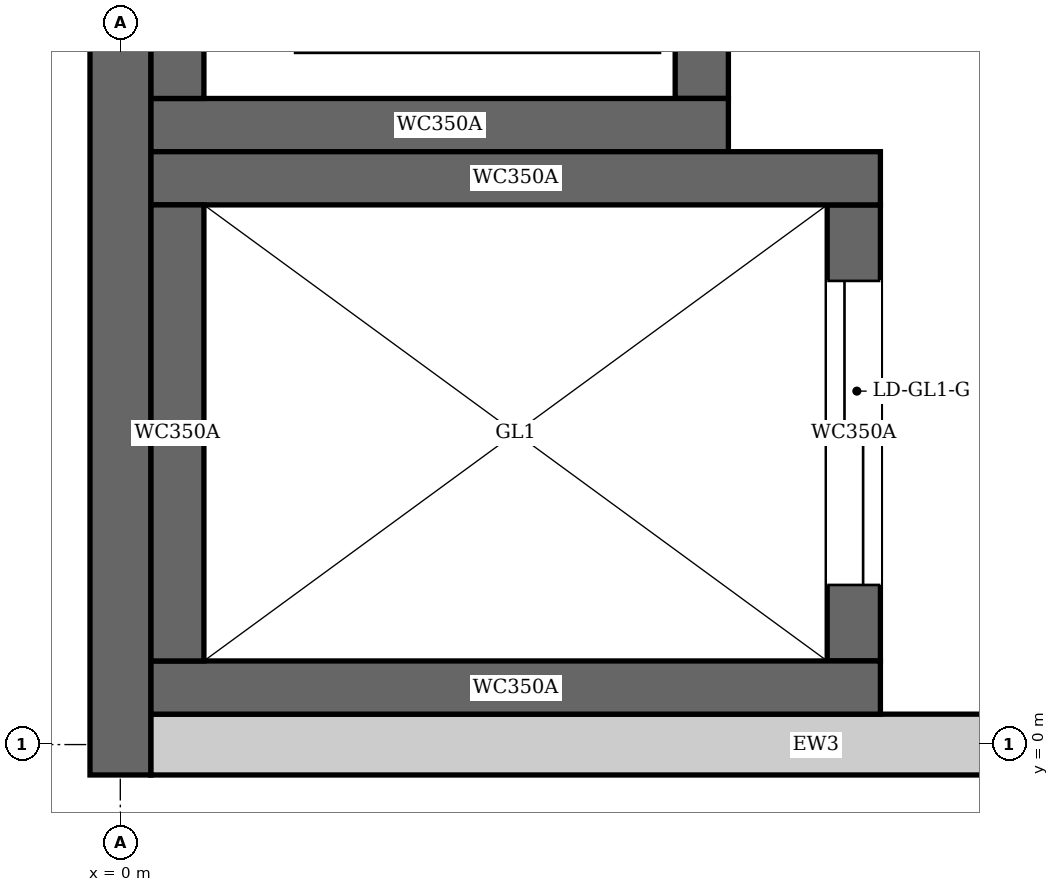
"""IFC4 building model, lengths in metres.
Left out: names, types, materials, properties, quantities, classifications, styles, units other than length and angle.
Written with IfcOpenShell. Run it as: python <this file> out.ifc"""

import sys

from ifc_helpers import new_model, si_unit, direction, frame, frame_2d, origin, place, context, subcontext, project, spatial, rectangle, extrude, element, fill, save


model = new_model("IFC4")
c1 = context("Model", 3, precision=1e-05, world=origin(), true_north=direction((0.0, 1.0)))
c2 = subcontext(c1, "Body", "Model", "MODEL_VIEW")
j1 = project(units=[si_unit("LENGTHUNIT", "METRE"), si_unit("PLANEANGLEUNIT", "RADIAN")], contexts=[c1])
p1 = place(None, origin())
s1 = spatial("IfcSite", under=j1, at=p1, CompositionType="ELEMENT")
p2 = place(p1, origin())
s2 = spatial("IfcBuilding", under=s1, at=p2, CompositionType="ELEMENT")
p3 = place(p2, origin())
s3 = spatial("IfcBuildingStorey", under=s2, at=p3, CompositionType="ELEMENT", Elevation=0.0)
p4 = place(p3, frame((0.0, -0.2, 0.0), z_axis=(0.0, 0.0, 1.0), x_axis=(0.0, 1.0, 0.0)))
e1 = element("IfcWall", 1, at=p4, inside=s3, PredefinedType="SHEAR", context=c2, shape_type="SweptSolid", body=[
    extrude(rectangle(XDim=46.88, YDim=0.4, at=frame_2d((23.44, 0.0))), origin(), (0.0, 0.0, 1.0), 6.5),
])
p5 = place(p4, frame((7.125, 0.0, 0.0)))
e2 = element("IfcOpeningElement", 2, at=p5, cuts=e1, PredefinedType="OPENING", context=c2, shape_type="SweptSolid", body=[
    extrude(rectangle(XDim=3.0, YDim=2.4, at=frame_2d((1.5, 1.2))), frame((0.0, 0.21, 0.0), z_axis=(0.0, -1.0, 0.0), x_axis=(1.0, 0.0, 0.0)), (0.0, 0.0, 1.0), 0.42),
])
p6 = place(p4, frame((38.2, 0.0, 0.0)))
e3 = element("IfcOpeningElement", 3, at=p6, cuts=e1, PredefinedType="OPENING", context=c2, shape_type="SweptSolid", body=[
    extrude(rectangle(XDim=3.0, YDim=2.4, at=frame_2d((1.5, 1.2))), frame((0.0, 0.21, 0.0), z_axis=(0.0, -1.0, 0.0), x_axis=(1.0, 0.0, 0.0)), (0.0, 0.0, 1.0), 0.42),
])
for number, where, z_axis, x_axis in (
    (4, (0.2, 0.375, 0.0), (0.0, 0.0, 1.0), (1.0, 0.0, 0.0)),
    (5, (0.2, 3.725, 0.0), (0.0, 0.0, 1.0), (1.0, 0.0, 0.0)),
):
    element("IfcWall", number, at=place(p3, frame(where, z_axis=z_axis, x_axis=x_axis)), inside=s3, PredefinedType="SHEAR", context=c2, shape_type="SweptSolid", body=[
        extrude(rectangle(XDim=4.8, YDim=0.35, at=frame_2d((2.4, 0.0))), origin(), (0.0, 0.0, 1.0), 6.5),
    ])
p7 = place(p3, frame((0.375, 0.55, 0.0), z_axis=(0.0, 0.0, 1.0), x_axis=(0.0, 1.0, 0.0)))
e6 = element("IfcWall", 6, at=p7, inside=s3, PredefinedType="SHEAR", context=c2, shape_type="SweptSolid", body=[
    extrude(rectangle(XDim=3.0, YDim=0.35, at=frame_2d((1.5, 0.0))), origin(), (0.0, 0.0, 1.0), 6.5),
])
p8 = place(p3, frame((4.825, 0.55, 0.0), z_axis=(0.0, 0.0, 1.0), x_axis=(0.0, 1.0, 0.0)))
e7 = element("IfcWall", 7, at=p8, inside=s3, PredefinedType="SHEAR", context=c2, shape_type="SweptSolid", body=[
    extrude(rectangle(XDim=3.0, YDim=0.35, at=frame_2d((1.5, 0.0))), origin(), (0.0, 0.0, 1.0), 6.5),
])
p9 = place(p8, frame((0.5, 0.0, 0.0)))
e8 = element("IfcOpeningElement", 8, at=p9, cuts=e7, PredefinedType="OPENING", context=c2, shape_type="SweptSolid", body=[
    extrude(rectangle(XDim=2.0, YDim=2.4, at=frame_2d((1.0, 1.2))), frame((0.0, 0.185, 0.0), z_axis=(0.0, -1.0, 0.0), x_axis=(1.0, 0.0, 0.0)), (0.0, 0.0, 1.0), 0.37),
])
p10 = place(p3, frame((0.2, 4.075, 0.0), z_axis=(0.0, 0.0, 1.0), x_axis=(1.0, 0.0, 0.0)))
e9 = element("IfcWall", 9, at=p10, inside=s3, PredefinedType="SHEAR", context=c2, shape_type="SweptSolid", body=[
    extrude(rectangle(XDim=3.8, YDim=0.35, at=frame_2d((1.9, 0.0))), origin(), (0.0, 0.0, 1.0), 6.5),
])
p11 = place(p3, frame((0.375, 4.25, 0.0), z_axis=(0.0, 0.0, 1.0), x_axis=(0.0, 1.0, 0.0)))
e10 = element("IfcWall", 10, at=p11, inside=s3, PredefinedType="SHEAR", context=c2, shape_type="SweptSolid", body=[
    extrude(rectangle(XDim=2.2, YDim=0.35, at=frame_2d((1.1, 0.0))), origin(), (0.0, 0.0, 1.0), 6.5),
])
p12 = place(p3, frame((3.825, 4.25, 0.0), z_axis=(0.0, 0.0, 1.0), x_axis=(0.0, 1.0, 0.0)))
e11 = element("IfcWall", 11, at=p12, inside=s3, PredefinedType="SHEAR", context=c2, shape_type="SweptSolid", body=[
    extrude(rectangle(XDim=2.2, YDim=0.35, at=frame_2d((1.1, 0.0))), origin(), (0.0, 0.0, 1.0), 6.5),
])
p13 = place(p12, frame((0.55, 0.0, 0.0)))
e12 = element("IfcOpeningElement", 12, at=p13, cuts=e11, PredefinedType="OPENING", context=c2, shape_type="SweptSolid", body=[
    extrude(rectangle(XDim=1.1, YDim=2.1, at=frame_2d((0.55, 1.05))), frame((0.0, 0.185, 0.0), z_axis=(0.0, -1.0, 0.0), x_axis=(1.0, 0.0, 0.0)), (0.0, 0.0, 1.0), 0.37),
])
p14 = place(p3, frame((0.2, 0.0, 0.0), z_axis=(0.0, 0.0, 1.0), x_axis=(1.0, 0.0, 0.0)))
e13 = element("IfcWall", 13, at=p14, inside=s3, PredefinedType="ELEMENTEDWALL", context=c2, shape_type="SweptSolid", body=[
    extrude(rectangle(XDim=8.75, YDim=0.4, at=frame_2d((4.375, 0.0))), origin(), (0.0, 0.0, 1.0), 6.15),
])
p15 = place(p9, origin())
e14 = element("IfcDoor", 14, at=p15, inside=s3, OperationType="DOUBLE_DOOR_SLIDING", PredefinedType="DOOR", context=c2, shape_type="SweptSolid", body=[
    extrude(rectangle(XDim=2.0, YDim=2.4, at=frame_2d((1.0, 1.2))), frame((0.0, 0.025, 0.0), z_axis=(0.0, -1.0, 0.0), x_axis=(1.0, 0.0, 0.0)), (0.0, 0.0, 1.0), 0.05),
])
fill(e8, e14)
save(model, sys.argv[1])
